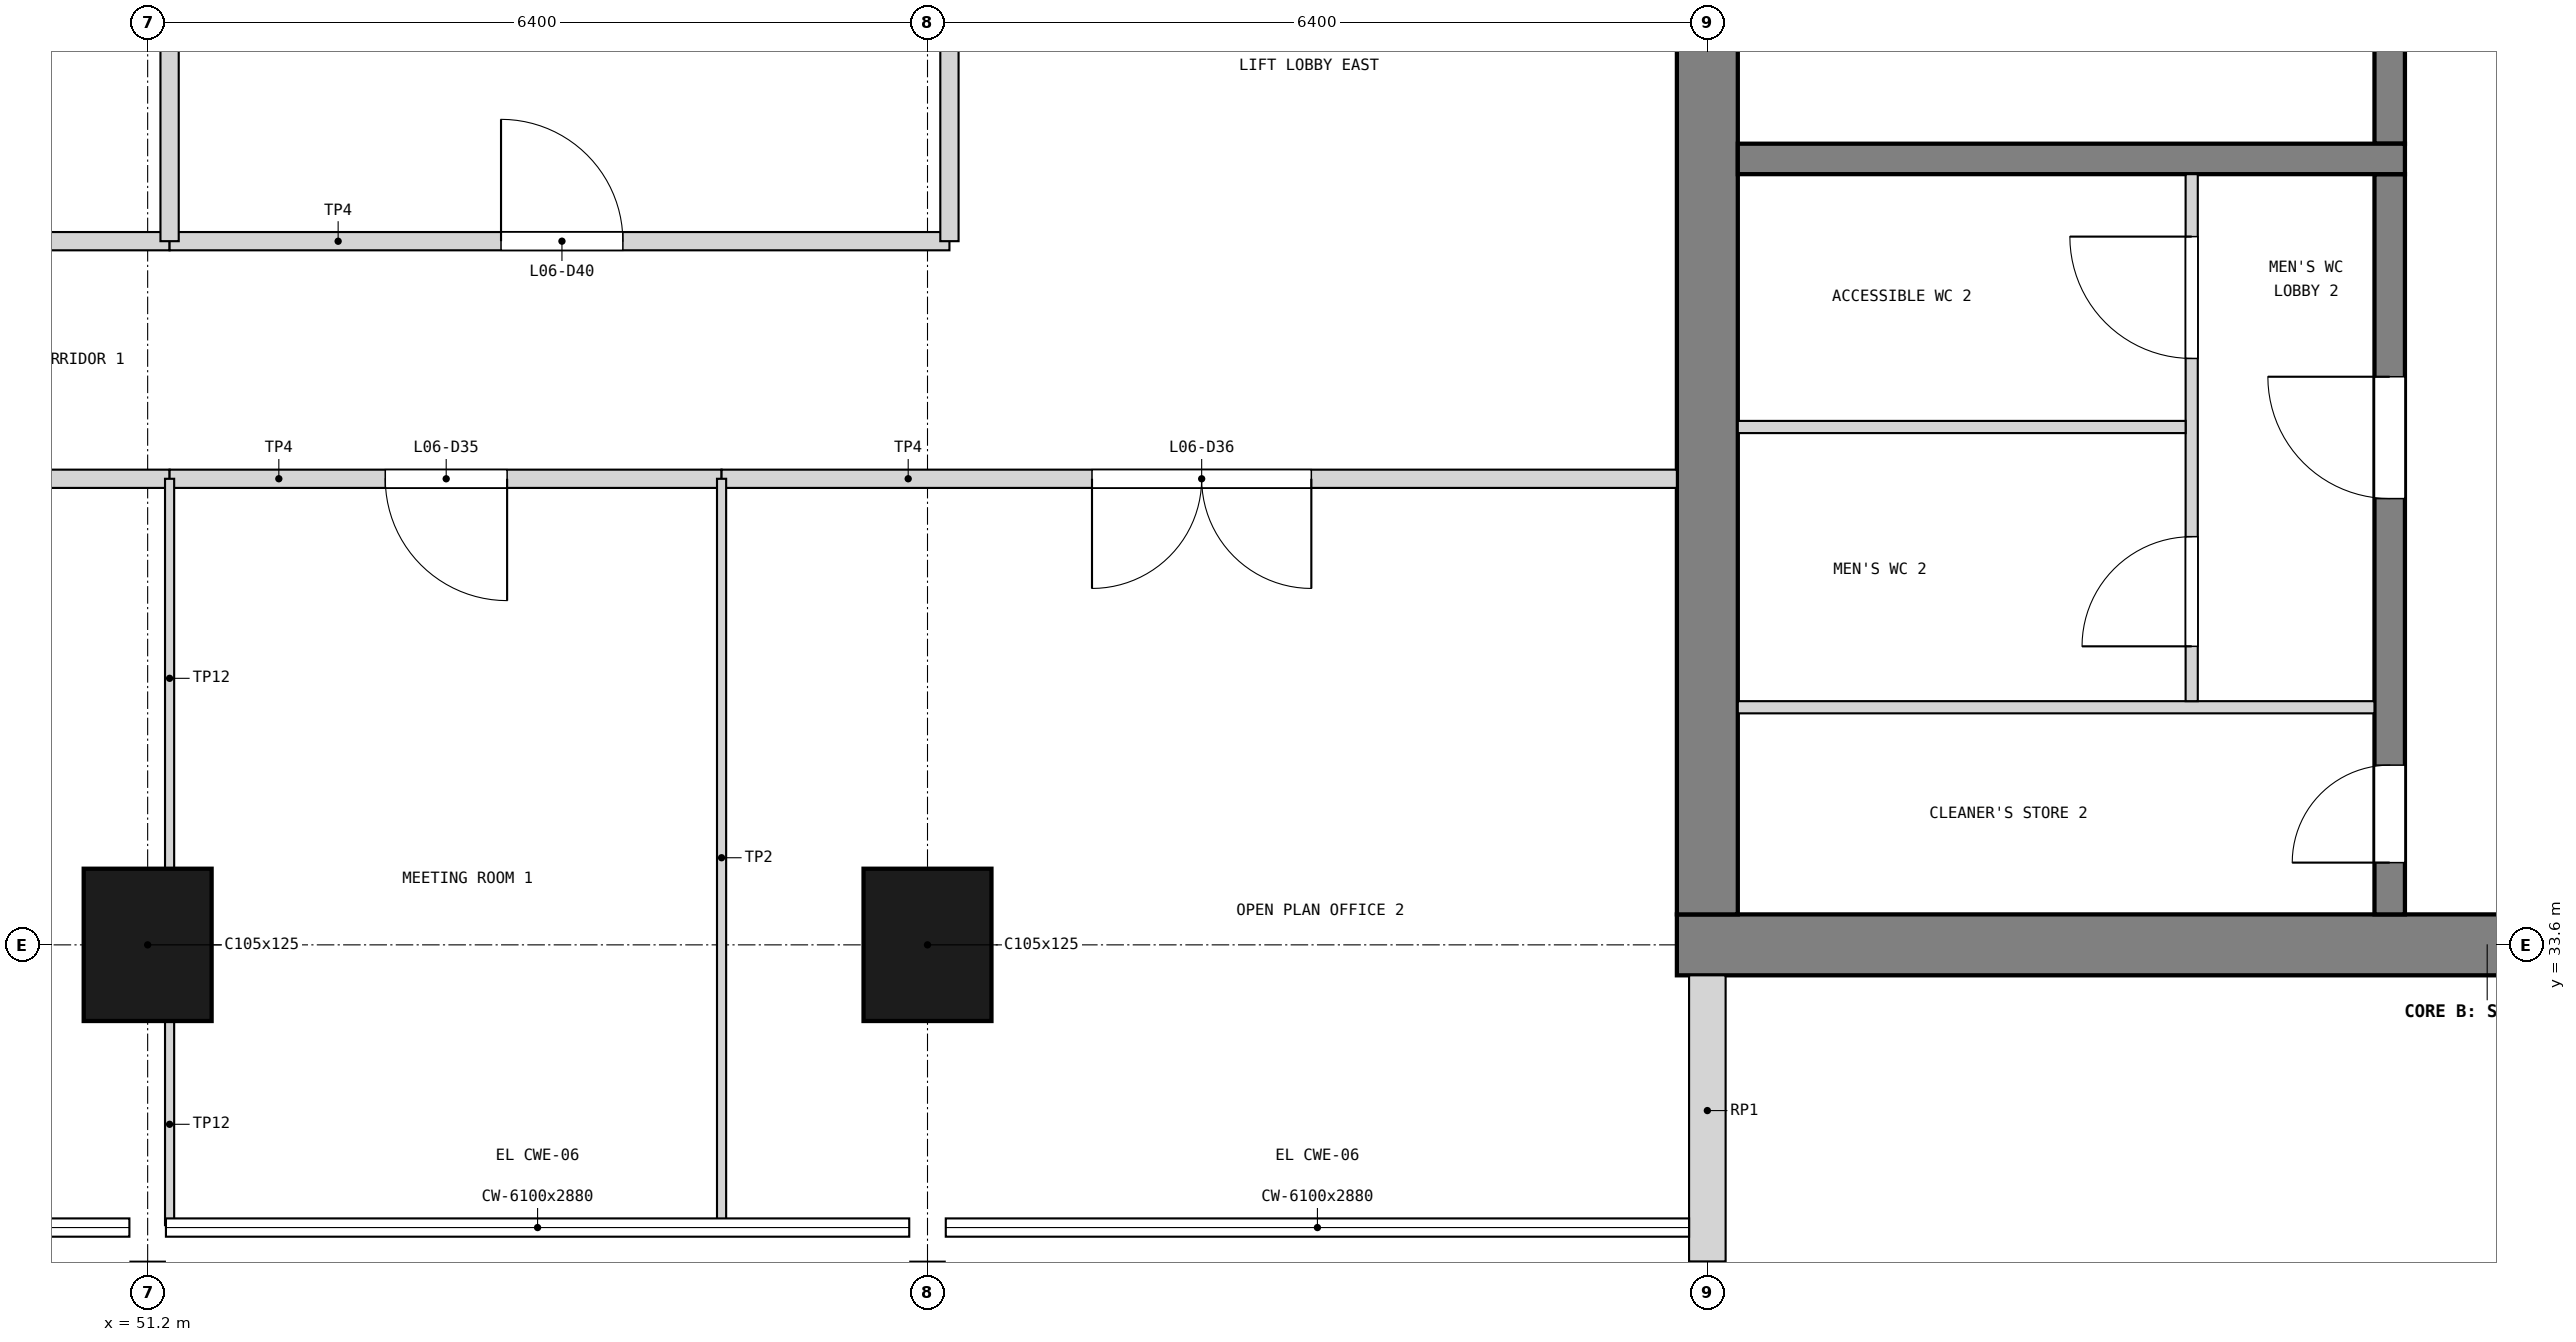
"""IFC4 building model, lengths in metres.
Left out: names, types, materials, properties, quantities, classifications, styles, units other than length and angle.
Written with IfcOpenShell. Run it as: python <this file> out.ifc"""

import sys

from ifc_helpers import new_model, si_unit, direction, frame, frame_2d, origin, origin_2d, place, context, subcontext, project, spatial, rectangle, extrude, element, fill, save


model = new_model("IFC4")
c1 = context("Model", 3, precision=1e-05, world=origin(), true_north=direction((0.0, 1.0)))
c2 = subcontext(c1, "Body", "Model", "MODEL_VIEW")
j1 = project(units=[si_unit("LENGTHUNIT", "METRE"), si_unit("PLANEANGLEUNIT", "RADIAN")], contexts=[c1])
p1 = place(None, origin())
s1 = spatial("IfcSite", under=j1, at=p1, CompositionType="ELEMENT")
p2 = place(p1, origin())
s2 = spatial("IfcBuilding", under=s1, at=p2, CompositionType="ELEMENT")
p3 = place(p2, frame((0.0, 0.0, 24.9)))
s3 = spatial("IfcBuildingStorey", under=s2, at=p3, CompositionType="ELEMENT", Elevation=24.9)
p4 = place(p3, frame((63.75, 33.6, 0.0), z_axis=(0.0, 0.0, 1.0), x_axis=(1.0, 0.0, 0.0)))
e1 = element("IfcWall", 1, at=p4, inside=s3, PredefinedType="SHEAR", context=c2, shape_type="SweptSolid", body=[
    extrude(rectangle(XDim=13.3, YDim=0.5, at=frame_2d((6.65, 0.0))), origin(), (0.0, 0.0, 1.0), 3.9),
])
p5 = place(p4, frame((11.05, 0.0, 1.0)))
e2 = element("IfcOpeningElement", 2, at=p5, cuts=e1, PredefinedType="OPENING", context=c2, shape_type="SweptSolid", body=[
    extrude(rectangle(XDim=0.4, YDim=2.0, at=frame_2d((0.2, 1.0))), frame((0.0, 0.26, 0.0), z_axis=(0.0, -1.0, 0.0), x_axis=(1.0, 0.0, 0.0)), (0.0, 0.0, 1.0), 0.52),
])
p6 = place(p3, frame((64.0, 33.85, 0.0), z_axis=(0.0, 0.0, 1.0), x_axis=(0.0, 1.0, 0.0)))
e3 = element("IfcWall", 3, at=p6, inside=s3, PredefinedType="SHEAR", context=c2, shape_type="SweptSolid", body=[
    extrude(rectangle(XDim=18.7, YDim=0.5, at=frame_2d((9.35, 0.0))), origin(), (0.0, 0.0, 1.0), 3.9),
])
p7 = place(p6, frame((8.35, 0.0, 0.0)))
e4 = element("IfcOpeningElement", 4, at=p7, cuts=e3, PredefinedType="OPENING", context=c2, shape_type="SweptSolid", body=[
    extrude(rectangle(XDim=2.0, YDim=2.1, at=frame_2d((1.0, 1.05))), frame((0.0, 0.26, 0.0), z_axis=(0.0, -1.0, 0.0), x_axis=(1.0, 0.0, 0.0)), (0.0, 0.0, 1.0), 0.52),
])
for number, where, z_axis, x_axis in (
    (5, (51.2, 33.6, 0.0), (0.0, 0.0, 1.0), (1.0, 0.0, 0.0)),
    (6, (57.6, 33.6, 0.0), (0.0, 0.0, 1.0), (1.0, 0.0, 0.0)),
):
    element("IfcColumn", number, at=place(p3, frame(where, z_axis=z_axis, x_axis=x_axis)), inside=s3, PredefinedType="COLUMN", context=c2, shape_type="SweptSolid", body=[
        extrude(rectangle(XDim=1.05, YDim=1.25, at=origin_2d()), origin(), (0.0, 0.0, 1.0), 3.9),
    ])
p8 = place(p3, frame((64.0, 31.0, 0.0), z_axis=(0.0, 0.0, 1.0), x_axis=(0.0, 1.0, 0.0)))
e7 = element("IfcWall", 7, at=p8, inside=s3, PredefinedType="SOLIDWALL", context=c2, shape_type="SweptSolid", body=[
    extrude(rectangle(XDim=2.35, YDim=0.3, at=frame_2d((1.175, 0.0))), origin(), (0.0, 0.0, 1.0), 2.88),
])
p9 = place(p3, frame((69.6, 33.85, 0.0), z_axis=(0.0, 0.0, 1.0), x_axis=(0.0, 1.0, 0.0)))
e8 = element("IfcWall", 8, at=p9, inside=s3, PredefinedType="SOLIDWALL", context=c2, shape_type="SweptSolid", body=[
    extrude(rectangle(XDim=6.075, YDim=0.25, at=frame_2d((3.038, 0.0))), origin(), (0.0, 0.0, 1.0), 3.6),
])
p10 = place(p9, frame((0.425, 0.0, 0.0)))
e9 = element("IfcOpeningElement", 9, at=p10, cuts=e8, PredefinedType="OPENING", context=c2, shape_type="SweptSolid", body=[
    extrude(rectangle(XDim=0.8, YDim=2.1, at=frame_2d((0.4, 1.05))), frame((0.0, 0.135, 0.0), z_axis=(0.0, -1.0, 0.0), x_axis=(1.0, 0.0, 0.0)), (0.0, 0.0, 1.0), 0.27),
])
p11 = place(p9, frame((3.413, 0.0, 0.0)))
e10 = element("IfcOpeningElement", 10, at=p11, cuts=e8, PredefinedType="OPENING", context=c2, shape_type="SweptSolid", body=[
    extrude(rectangle(XDim=1.0, YDim=2.1, at=frame_2d((0.5, 1.05))), frame((0.0, 0.135, 0.0), z_axis=(0.0, -1.0, 0.0), x_axis=(1.0, 0.0, 0.0)), (0.0, 0.0, 1.0), 0.27),
])
p12 = place(p3, frame((69.6, 40.175, 0.0), z_axis=(0.0, 0.0, 1.0), x_axis=(0.0, 1.0, 0.0)))
e11 = element("IfcWall", 11, at=p12, inside=s3, PredefinedType="SOLIDWALL", context=c2, shape_type="SweptSolid", body=[
    extrude(rectangle(XDim=6.05, YDim=0.25, at=frame_2d((3.025, 0.0))), origin(), (0.0, 0.0, 1.0), 3.6),
])
p13 = place(p12, frame((2.025, 0.0, 0.0)))
e12 = element("IfcOpeningElement", 12, at=p13, cuts=e11, PredefinedType="OPENING", context=c2, shape_type="SweptSolid", body=[
    extrude(rectangle(XDim=2.0, YDim=2.1, at=frame_2d((1.0, 1.05))), frame((0.0, 0.135, 0.0), z_axis=(0.0, -1.0, 0.0), x_axis=(1.0, 0.0, 0.0)), (0.0, 0.0, 1.0), 0.27),
])
p14 = place(p3, frame((69.725, 40.05, 0.0), z_axis=(0.0, 0.0, 1.0), x_axis=(-1.0, 0.0, 0.0)))
e13 = element("IfcWall", 13, at=p14, inside=s3, PredefinedType="SOLIDWALL", context=c2, shape_type="SweptSolid", body=[
    extrude(rectangle(XDim=5.475, YDim=0.25, at=frame_2d((2.738, 0.0))), origin(), (0.0, 0.0, 1.0), 3.6),
])
p15 = place(p3, frame((69.475, 35.55, 0.0), z_axis=(0.0, 0.0, 1.0), x_axis=(-1.0, 0.0, 0.0)))
e14 = element("IfcWall", 14, at=p15, inside=s3, PredefinedType="PARTITIONING", context=c2, shape_type="SweptSolid", body=[
    extrude(rectangle(XDim=5.225, YDim=0.1, at=frame_2d((2.613, 0.0))), origin(), (0.0, 0.0, 1.0), 3.6),
])
p16 = place(p3, frame((67.975, 35.6, 0.0), z_axis=(0.0, 0.0, 1.0), x_axis=(0.0, 1.0, 0.0)))
e15 = element("IfcWall", 15, at=p16, inside=s3, PredefinedType="PARTITIONING", context=c2, shape_type="SweptSolid", body=[
    extrude(rectangle(XDim=4.325, YDim=0.1, at=frame_2d((2.163, 0.0))), origin(), (0.0, 0.0, 1.0), 3.6),
])
p17 = place(p16, frame((0.45, 0.0, 0.0)))
e16 = element("IfcOpeningElement", 16, at=p17, cuts=e15, PredefinedType="OPENING", context=c2, shape_type="SweptSolid", body=[
    extrude(rectangle(XDim=0.9, YDim=2.1, at=frame_2d((0.45, 1.05))), frame((0.0, 0.06, 0.0), z_axis=(0.0, -1.0, 0.0), x_axis=(1.0, 0.0, 0.0)), (0.0, 0.0, 1.0), 0.12),
])
p18 = place(p16, frame((2.812, 0.0, 0.0)))
e17 = element("IfcOpeningElement", 17, at=p18, cuts=e15, PredefinedType="OPENING", context=c2, shape_type="SweptSolid", body=[
    extrude(rectangle(XDim=1.0, YDim=2.1, at=frame_2d((0.5, 1.05))), frame((0.0, 0.06, 0.0), z_axis=(0.0, -1.0, 0.0), x_axis=(1.0, 0.0, 0.0)), (0.0, 0.0, 1.0), 0.12),
])
p19 = place(p3, frame((67.925, 37.85, 0.0), z_axis=(0.0, 0.0, 1.0), x_axis=(-1.0, 0.0, 0.0)))
e18 = element("IfcWall", 18, at=p19, inside=s3, PredefinedType="PARTITIONING", context=c2, shape_type="SweptSolid", body=[
    extrude(rectangle(XDim=3.675, YDim=0.1, at=frame_2d((1.837, 0.0))), origin(), (0.0, 0.0, 1.0), 3.6),
])
p20 = place(p3, frame((38.22, 37.425, 0.0), z_axis=(0.0, 0.0, 1.0), x_axis=(1.0, 0.0, 0.0)))
e19 = element("IfcWall", 19, at=p20, inside=s3, PredefinedType="PARTITIONING", context=c2, shape_type="SweptSolid", body=[
    extrude(rectangle(XDim=13.16, YDim=0.15, at=frame_2d((6.58, 0.0))), origin(), (0.0, 0.0, 1.0), 3.68),
])
p21 = place(p20, frame((2.43, 0.0, 0.0)))
e20 = element("IfcOpeningElement", 20, at=p21, cuts=e19, PredefinedType="OPENING", context=c2, shape_type="SweptSolid", body=[
    extrude(rectangle(XDim=1.8, YDim=2.1, at=frame_2d((0.9, 1.05))), frame((0.0, 0.085, 0.0), z_axis=(0.0, -1.0, 0.0), x_axis=(1.0, 0.0, 0.0)), (0.0, 0.0, 1.0), 0.17),
])
p22 = place(p20, frame((8.93, 0.0, 0.0)))
e21 = element("IfcOpeningElement", 21, at=p22, cuts=e19, PredefinedType="OPENING", context=c2, shape_type="SweptSolid", body=[
    extrude(rectangle(XDim=1.8, YDim=2.1, at=frame_2d((0.9, 1.05))), frame((0.0, 0.085, 0.0), z_axis=(0.0, -1.0, 0.0), x_axis=(1.0, 0.0, 0.0)), (0.0, 0.0, 1.0), 0.17),
])
p23 = place(p3, frame((51.38, 37.425, 0.0), z_axis=(0.0, 0.0, 1.0), x_axis=(1.0, 0.0, 0.0)))
e22 = element("IfcWall", 22, at=p23, inside=s3, PredefinedType="PARTITIONING", context=c2, shape_type="SweptSolid", body=[
    extrude(rectangle(XDim=4.53, YDim=0.15, at=frame_2d((2.265, 0.0))), origin(), (0.0, 0.0, 1.0), 3.68),
])
p24 = place(p23, frame((1.77, 0.0, 0.0)))
e23 = element("IfcOpeningElement", 23, at=p24, cuts=e22, PredefinedType="OPENING", context=c2, shape_type="SweptSolid", body=[
    extrude(rectangle(XDim=1.0, YDim=2.1, at=frame_2d((0.5, 1.05))), frame((0.0, 0.085, 0.0), z_axis=(0.0, -1.0, 0.0), x_axis=(1.0, 0.0, 0.0)), (0.0, 0.0, 1.0), 0.17),
])
p25 = place(p3, frame((55.91, 37.425, 0.0), z_axis=(0.0, 0.0, 1.0), x_axis=(1.0, 0.0, 0.0)))
e24 = element("IfcWall", 24, at=p25, inside=s3, PredefinedType="PARTITIONING", context=c2, shape_type="SweptSolid", body=[
    extrude(rectangle(XDim=7.84, YDim=0.15, at=frame_2d((3.92, 0.0))), origin(), (0.0, 0.0, 1.0), 3.68),
])
p26 = place(p25, frame((3.04, 0.0, 0.0)))
e25 = element("IfcOpeningElement", 25, at=p26, cuts=e24, PredefinedType="OPENING", context=c2, shape_type="SweptSolid", body=[
    extrude(rectangle(XDim=1.8, YDim=2.1, at=frame_2d((0.9, 1.05))), frame((0.0, 0.085, 0.0), z_axis=(0.0, -1.0, 0.0), x_axis=(1.0, 0.0, 0.0)), (0.0, 0.0, 1.0), 0.17),
])
p27 = place(p3, frame((51.38, 31.3, 0.0), z_axis=(0.0, 0.0, 1.0), x_axis=(0.0, 1.0, 0.0)))
e26 = element("IfcWall", 26, at=p27, inside=s3, PredefinedType="PARTITIONING", context=c2, shape_type="SweptSolid", body=[
    extrude(rectangle(XDim=1.695, YDim=0.075, at=frame_2d((0.848, 0.0))), origin(), (0.0, 0.0, 1.0), 2.78),
])
p28 = place(p3, frame((51.38, 34.205, 0.0), z_axis=(0.0, 0.0, 1.0), x_axis=(0.0, 1.0, 0.0)))
e27 = element("IfcWall", 27, at=p28, inside=s3, PredefinedType="PARTITIONING", context=c2, shape_type="SweptSolid", body=[
    extrude(rectangle(XDim=3.22, YDim=0.075, at=frame_2d((1.61, 0.0))), origin(), (0.0, 0.0, 1.0), 2.78),
])
p29 = place(p3, frame((55.91, 31.3, 0.0), z_axis=(0.0, 0.0, 1.0), x_axis=(0.0, 1.0, 0.0)))
e28 = element("IfcWall", 28, at=p29, inside=s3, PredefinedType="PARTITIONING", context=c2, shape_type="SweptSolid", body=[
    extrude(rectangle(XDim=6.125, YDim=0.075, at=frame_2d((3.062, 0.0))), origin(), (0.0, 0.0, 1.0), 3.68),
])
p30 = place(p3, frame((44.62, 39.375, 0.0), z_axis=(0.0, 0.0, 1.0), x_axis=(1.0, 0.0, 0.0)))
e29 = element("IfcWall", 29, at=p30, inside=s3, PredefinedType="PARTITIONING", context=c2, shape_type="SweptSolid", body=[
    extrude(rectangle(XDim=6.76, YDim=0.15, at=frame_2d((3.38, 0.0))), origin(), (0.0, 0.0, 1.0), 3.68),
])
p31 = place(p30, frame((2.48, 0.0, 0.0)))
e30 = element("IfcOpeningElement", 30, at=p31, cuts=e29, PredefinedType="OPENING", context=c2, shape_type="SweptSolid", body=[
    extrude(rectangle(XDim=1.8, YDim=2.1, at=frame_2d((0.9, 1.05))), frame((0.0, 0.085, 0.0), z_axis=(0.0, -1.0, 0.0), x_axis=(1.0, 0.0, 0.0)), (0.0, 0.0, 1.0), 0.17),
])
p32 = place(p3, frame((51.38, 39.375, 0.0), z_axis=(0.0, 0.0, 1.0), x_axis=(1.0, 0.0, 0.0)))
e31 = element("IfcWall", 31, at=p32, inside=s3, PredefinedType="PARTITIONING", context=c2, shape_type="SweptSolid", body=[
    extrude(rectangle(XDim=6.4, YDim=0.15, at=frame_2d((3.2, 0.0))), origin(), (0.0, 0.0, 1.0), 3.68),
])
p33 = place(p32, frame((2.72, 0.0, 0.0)))
e32 = element("IfcOpeningElement", 32, at=p33, cuts=e31, PredefinedType="OPENING", context=c2, shape_type="SweptSolid", body=[
    extrude(rectangle(XDim=1.0, YDim=2.1, at=frame_2d((0.5, 1.05))), frame((0.0, 0.085, 0.0), z_axis=(0.0, -1.0, 0.0), x_axis=(1.0, 0.0, 0.0)), (0.0, 0.0, 1.0), 0.17),
])
for number, where, z_axis, x_axis in (
    (33, (51.38, 39.375, 0.0), (0.0, 0.0, 1.0), (0.0, 1.0, 0.0)),
    (34, (57.78, 39.375, 0.0), (0.0, 0.0, 1.0), (0.0, 1.0, 0.0)),
):
    element("IfcWall", number, at=place(p3, frame(where, z_axis=z_axis, x_axis=x_axis)), inside=s3, PredefinedType="PARTITIONING", context=c2, shape_type="SweptSolid", body=[
        extrude(rectangle(XDim=3.352, YDim=0.15, at=frame_2d((1.676, 0.0))), origin(), (0.0, 0.0, 1.0), 2.78),
    ])
p34 = place(p10, origin())
e35 = element("IfcDoor", 35, at=p34, inside=s3, OperationType="SINGLE_SWING_LEFT", PredefinedType="DOOR", context=c2, shape_type="SweptSolid", body=[
    extrude(rectangle(XDim=0.8, YDim=2.1, at=frame_2d((0.4, 1.05))), frame((0.0, 0.025, 0.0), z_axis=(0.0, -1.0, 0.0), x_axis=(1.0, 0.0, 0.0)), (0.0, 0.0, 1.0), 0.05),
])
fill(e9, e35)
p35 = place(p11, origin())
e36 = element("IfcDoor", 36, at=p35, inside=s3, OperationType="SINGLE_SWING_RIGHT", PredefinedType="DOOR", context=c2, shape_type="SweptSolid", body=[
    extrude(rectangle(XDim=1.0, YDim=2.1, at=frame_2d((0.5, 1.05))), frame((0.0, 0.025, 0.0), z_axis=(0.0, -1.0, 0.0), x_axis=(1.0, 0.0, 0.0)), (0.0, 0.0, 1.0), 0.05),
])
fill(e10, e36)
p36 = place(p17, origin())
e37 = element("IfcDoor", 37, at=p36, inside=s3, OperationType="SINGLE_SWING_LEFT", PredefinedType="DOOR", context=c2, shape_type="SweptSolid", body=[
    extrude(rectangle(XDim=0.9, YDim=2.1, at=frame_2d((0.45, 1.05))), frame((0.0, 0.025, 0.0), z_axis=(0.0, -1.0, 0.0), x_axis=(1.0, 0.0, 0.0)), (0.0, 0.0, 1.0), 0.05),
])
fill(e16, e37)
p37 = place(p18, origin())
e38 = element("IfcDoor", 38, at=p37, inside=s3, OperationType="SINGLE_SWING_RIGHT", PredefinedType="DOOR", context=c2, shape_type="SweptSolid", body=[
    extrude(rectangle(XDim=1.0, YDim=2.1, at=frame_2d((0.5, 1.05))), frame((0.0, 0.025, 0.0), z_axis=(0.0, -1.0, 0.0), x_axis=(1.0, 0.0, 0.0)), (0.0, 0.0, 1.0), 0.05),
])
fill(e17, e38)
p38 = place(p24, frame((1.0, 0.0, 0.0), z_axis=(0.0, 0.0, 1.0), x_axis=(-1.0, 0.0, 0.0)))
e39 = element("IfcDoor", 39, at=p38, inside=s3, OperationType="SINGLE_SWING_LEFT", PredefinedType="DOOR", context=c2, shape_type="SweptSolid", body=[
    extrude(rectangle(XDim=1.0, YDim=2.1, at=frame_2d((0.5, 1.05))), frame((0.0, 0.025, 0.0), z_axis=(0.0, -1.0, 0.0), x_axis=(1.0, 0.0, 0.0)), (0.0, 0.0, 1.0), 0.05),
])
fill(e23, e39)
p39 = place(p26, frame((1.8, 0.0, 0.0), z_axis=(0.0, 0.0, 1.0), x_axis=(-1.0, 0.0, 0.0)))
e40 = element("IfcDoor", 40, at=p39, inside=s3, OperationType="DOUBLE_DOOR_SINGLE_SWING", PredefinedType="DOOR", context=c2, shape_type="SweptSolid", body=[
    extrude(rectangle(XDim=1.8, YDim=2.1, at=frame_2d((0.9, 1.05))), frame((0.0, 0.025, 0.0), z_axis=(0.0, -1.0, 0.0), x_axis=(1.0, 0.0, 0.0)), (0.0, 0.0, 1.0), 0.05),
])
fill(e25, e40)
p40 = place(p33, origin())
e41 = element("IfcDoor", 41, at=p40, inside=s3, OperationType="SINGLE_SWING_LEFT", PredefinedType="DOOR", context=c2, shape_type="SweptSolid", body=[
    extrude(rectangle(XDim=1.0, YDim=2.1, at=frame_2d((0.5, 1.05))), frame((0.0, 0.025, 0.0), z_axis=(0.0, -1.0, 0.0), x_axis=(1.0, 0.0, 0.0)), (0.0, 0.0, 1.0), 0.05),
])
fill(e32, e41)
save(model, sys.argv[1])
